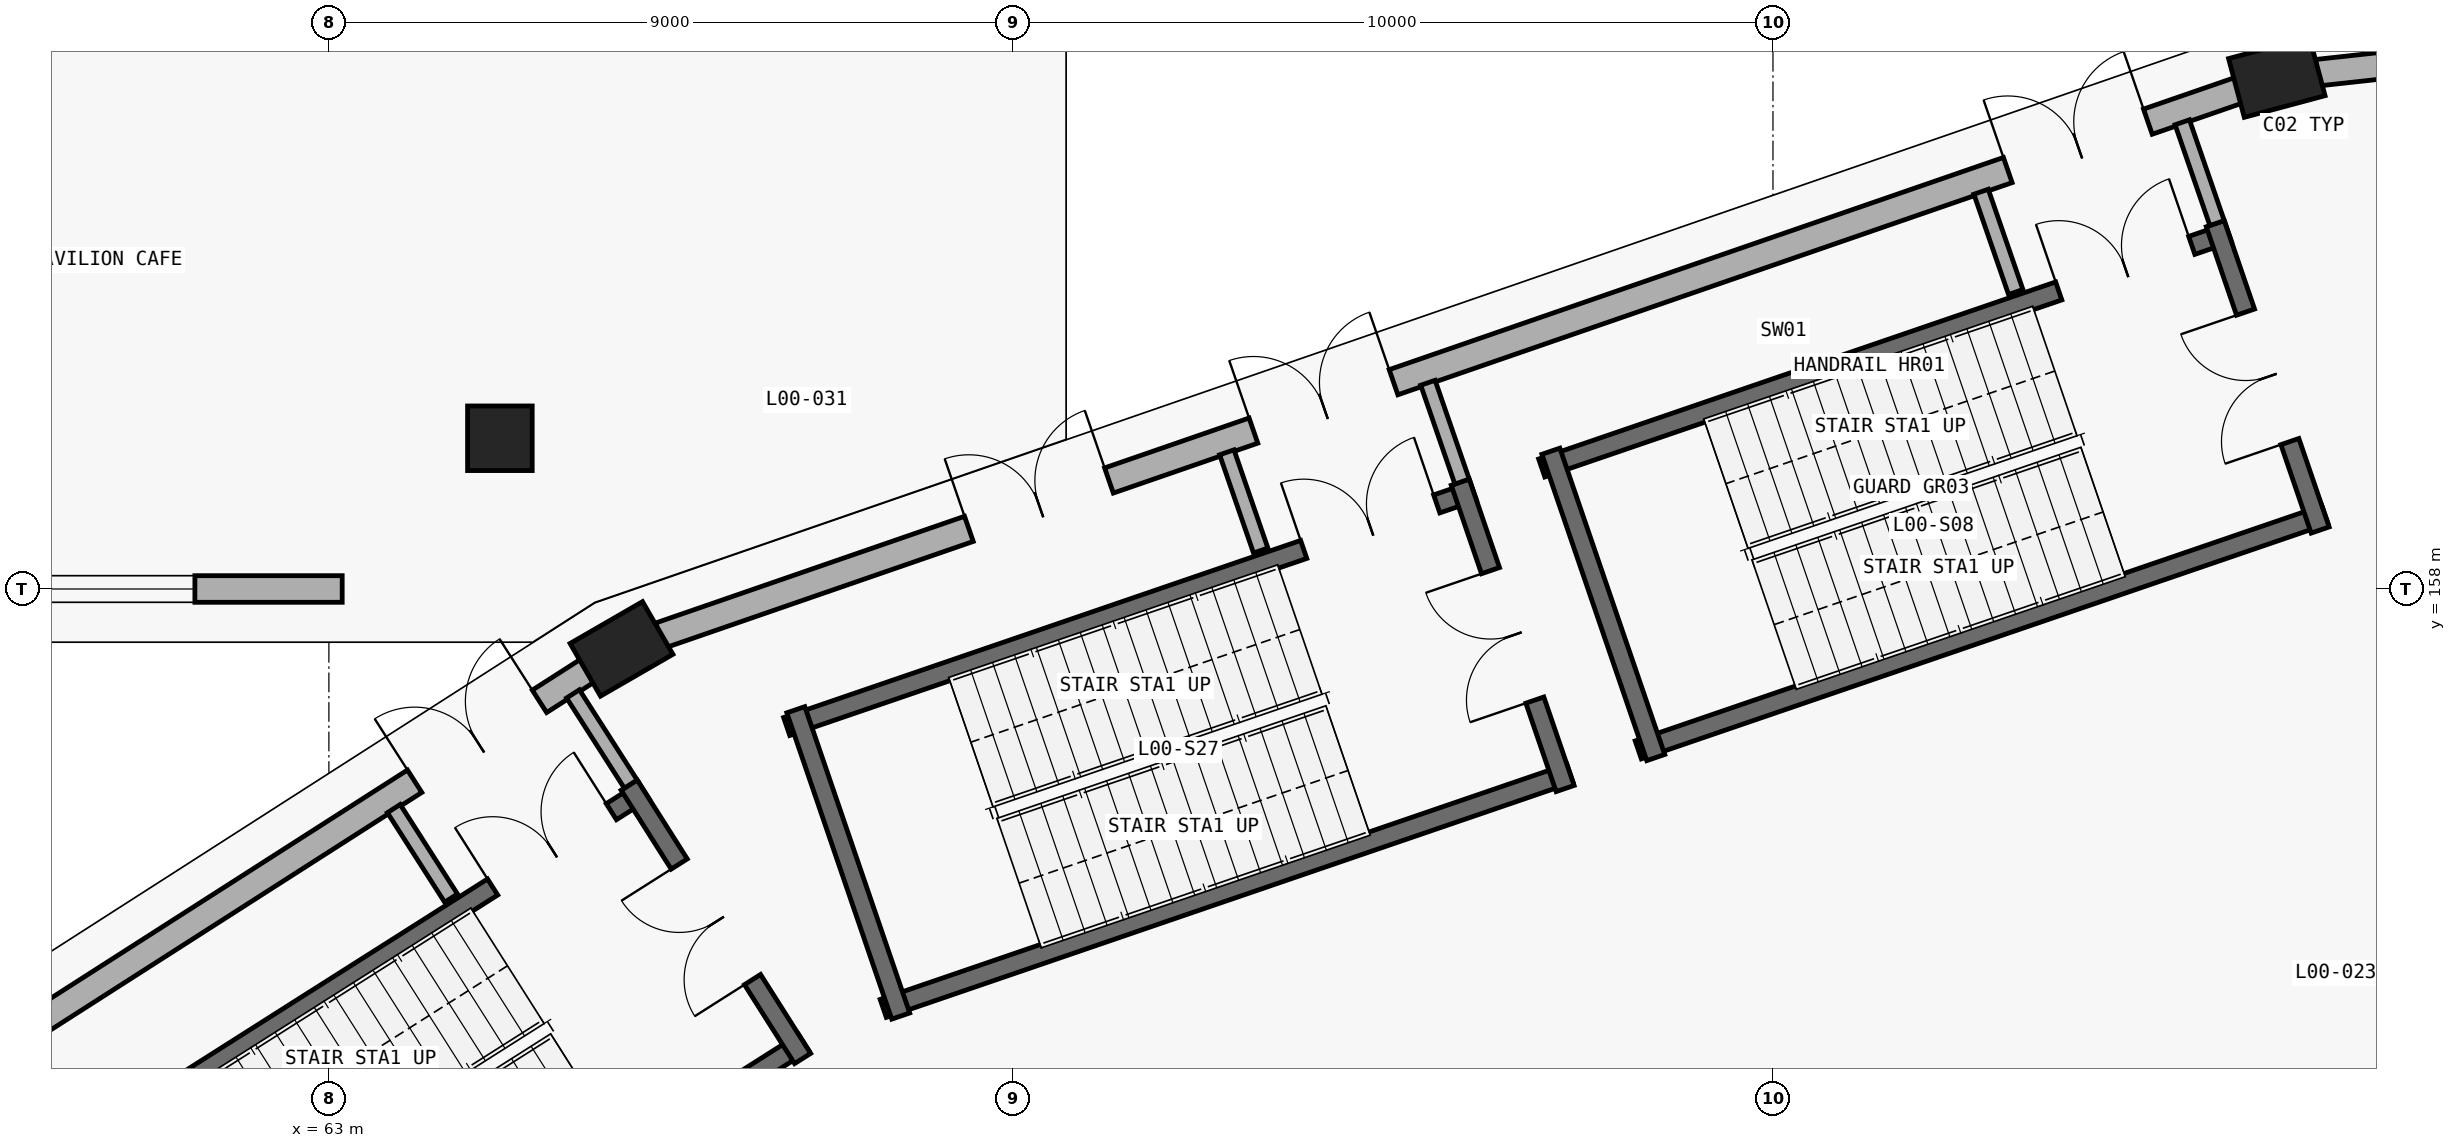
"""IFC4 building model, lengths in metres.
Left out: names, types, materials, properties, quantities, classifications, styles, units other than length and angle.
Written with IfcOpenShell. Run it as: python <this file> out.ifc"""

import sys

from ifc_helpers import new_model, si_unit, direction, frame, frame_2d, origin, origin_2d, place, context, subcontext, project, spatial, rectangle, circle, extrude, element, fill, save


model = new_model("IFC4")
c1 = context("Model", 3, precision=1e-05, world=origin(), true_north=direction((0.0, 1.0)))
c2 = subcontext(c1, "Body", "Model", "MODEL_VIEW")
j1 = project(units=[si_unit("LENGTHUNIT", "METRE"), si_unit("PLANEANGLEUNIT", "RADIAN")], contexts=[c1])
p1 = place(None, origin())
s1 = spatial("IfcSite", under=j1, at=p1, CompositionType="ELEMENT")
p2 = place(p1, origin())
s2 = spatial("IfcBuilding", under=s1, at=p2, CompositionType="ELEMENT")
p3 = place(p2, origin())
s3 = spatial("IfcBuildingStorey", under=s2, at=p3, CompositionType="ELEMENT", Elevation=0.0)
for number, where, z_axis, x_axis in (
    (1, (88.629, 164.734, 0.0), (0.0, 0.0, 1.0), (-0.259, 0.966, 0.0)),
    (2, (66.85, 157.212, 0.0), (0.0, 0.0, 1.0), (-0.5, 0.866, 0.0)),
):
    element("IfcColumn", number, at=place(p3, frame(where, z_axis=z_axis, x_axis=x_axis)), inside=s3, PredefinedType="COLUMN", context=c2, shape_type="SweptSolid", body=[
        extrude(rectangle(XDim=0.8, YDim=1.1, at=origin_2d()), origin(), (0.0, 0.0, 1.0), 5.4),
    ])
p4 = place(p3, frame((65.25, 159.983, 0.0), z_axis=(0.0, 0.0, 1.0), x_axis=(1.0, 0.0, 0.0)))
e3 = element("IfcColumn", 3, at=p4, inside=s3, PredefinedType="COLUMN", context=c2, shape_type="SweptSolid", body=[
    extrude(circle(Radius=0.425, at=origin_2d()), origin(), (0.0, 0.0, 1.0), 5.4),
])
p5 = place(p3, frame((89.157, 164.792, 0.0), z_axis=(0.0, 0.0, 1.0), x_axis=(0.994028735725, 0.10911861689, 0.0)))
e4 = element("IfcWall", 4, at=p5, inside=s3, PredefinedType="STANDARD", context=c2, shape_type="SweptSolid", body=[
    extrude(rectangle(XDim=22.452, YDim=0.35, at=frame_2d((11.226, 0.0))), origin(), (0.0, 0.0, 1.0), 4.165),
])
p6 = place(p5, frame((17.906, 0.0, 0.0)))
e5 = element("IfcOpeningElement", 5, at=p6, cuts=e4, PredefinedType="OPENING", context=c2, shape_type="SweptSolid", body=[
    extrude(rectangle(XDim=1.95, YDim=2.25, at=frame_2d((0.975, 1.125))), frame((0.0, 0.185, 0.0), z_axis=(0.0, -1.0, 0.0), x_axis=(1.0, 0.0, 0.0)), (0.0, 0.0, 1.0), 0.37),
])
p7 = place(p5, frame((3.838, 0.0, 0.0)))
e6 = element("IfcOpeningElement", 6, at=p7, cuts=e4, PredefinedType="OPENING", context=c2, shape_type="SweptSolid", body=[
    extrude(rectangle(XDim=3.1, YDim=2.58, at=frame_2d((1.55, 1.29))), frame((0.0, 0.185, 0.0), z_axis=(0.0, -1.0, 0.0), x_axis=(1.0, 0.0, 0.0)), (0.0, 0.0, 1.0), 0.37),
])
p8 = place(p3, frame((67.356, 157.387, 0.0), z_axis=(0.0, 0.0, 1.0), x_axis=(0.945215757663, 0.326446276538, 0.0)))
e7 = element("IfcWall", 7, at=p8, inside=s3, PredefinedType="STANDARD", context=c2, shape_type="SweptSolid", body=[
    extrude(rectangle(XDim=21.979, YDim=0.35, at=frame_2d((10.99, 0.0))), origin(), (0.0, 0.0, 1.0), 4.165),
])
p9 = place(p8, frame((18.761, 0.0, 0.0)))
e8 = element("IfcOpeningElement", 8, at=p9, cuts=e7, PredefinedType="OPENING", context=c2, shape_type="SweptSolid", body=[
    extrude(rectangle(XDim=1.95, YDim=2.25, at=frame_2d((0.975, 1.125))), frame((0.0, 0.185, 0.0), z_axis=(0.0, -1.0, 0.0), x_axis=(1.0, 0.0, 0.0)), (0.0, 0.0, 1.0), 0.37),
])
p10 = place(p8, frame((8.261, 0.0, 0.0)))
e9 = element("IfcOpeningElement", 9, at=p10, cuts=e7, PredefinedType="OPENING", context=c2, shape_type="SweptSolid", body=[
    extrude(rectangle(XDim=1.95, YDim=2.25, at=frame_2d((0.975, 1.125))), frame((0.0, 0.185, 0.0), z_axis=(0.0, -1.0, 0.0), x_axis=(1.0, 0.0, 0.0)), (0.0, 0.0, 1.0), 0.37),
])
p11 = place(p8, frame((4.3, 0.0, 0.0)))
e10 = element("IfcOpeningElement", 10, at=p11, cuts=e7, PredefinedType="OPENING", context=c2, shape_type="SweptSolid", body=[
    extrude(rectangle(XDim=1.95, YDim=2.25, at=frame_2d((0.975, 1.125))), frame((0.0, 0.185, 0.0), z_axis=(0.0, -1.0, 0.0), x_axis=(1.0, 0.0, 0.0)), (0.0, 0.0, 1.0), 0.37),
])
p12 = place(p3, frame((48.601, 145.535, 0.0), z_axis=(0.0, 0.0, 1.0), x_axis=(0.842308733224, 0.538995359845, 0.0)))
e11 = element("IfcWall", 11, at=p12, inside=s3, PredefinedType="STANDARD", context=c2, shape_type="SweptSolid", body=[
    extrude(rectangle(XDim=21.139, YDim=0.35, at=frame_2d((10.57, 0.0))), origin(), (0.0, 0.0, 1.0), 4.165),
])
p13 = place(p12, frame((18.434, 0.0, 0.0)))
e12 = element("IfcOpeningElement", 12, at=p13, cuts=e11, PredefinedType="OPENING", context=c2, shape_type="SweptSolid", body=[
    extrude(rectangle(XDim=1.95, YDim=2.25, at=frame_2d((0.975, 1.125))), frame((0.0, 0.185, 0.0), z_axis=(0.0, -1.0, 0.0), x_axis=(1.0, 0.0, 0.0)), (0.0, 0.0, 1.0), 0.37),
])
p14 = place(p12, frame((7.935, 0.0, 0.0)))
e13 = element("IfcOpeningElement", 13, at=p14, cuts=e11, PredefinedType="OPENING", context=c2, shape_type="SweptSolid", body=[
    extrude(rectangle(XDim=1.95, YDim=2.25, at=frame_2d((0.975, 1.125))), frame((0.0, 0.185, 0.0), z_axis=(0.0, -1.0, 0.0), x_axis=(1.0, 0.0, 0.0)), (0.0, 0.0, 1.0), 0.37),
])
p15 = place(p12, frame((4.098, 0.0, 0.0)))
e14 = element("IfcOpeningElement", 14, at=p15, cuts=e11, PredefinedType="OPENING", context=c2, shape_type="SweptSolid", body=[
    extrude(rectangle(XDim=1.95, YDim=2.25, at=frame_2d((0.975, 1.125))), frame((0.0, 0.185, 0.0), z_axis=(0.0, -1.0, 0.0), x_axis=(1.0, 0.0, 0.0)), (0.0, 0.0, 1.0), 0.37),
])
p16 = place(p3, frame((63.175, 158.0, 0.0), z_axis=(0.0, 0.0, 1.0), x_axis=(-1.0, 0.0, 0.0)))
e15 = element("IfcWall", 15, at=p16, inside=s3, PredefinedType="STANDARD", context=c2, shape_type="SweptSolid", body=[
    extrude(rectangle(XDim=8.75, YDim=0.35, at=frame_2d((4.375, 0.0))), origin(), (0.0, 0.0, 1.0), 4.384),
])
p17 = place(p16, frame((1.938, 0.0, 0.95)))
e16 = element("IfcOpeningElement", 16, at=p17, cuts=e15, PredefinedType="OPENING", context=c2, shape_type="SweptSolid", body=[
    extrude(rectangle(XDim=2.25, YDim=2.15, at=frame_2d((1.125, 1.075))), frame((0.0, 0.185, 0.0), z_axis=(0.0, -1.0, 0.0), x_axis=(1.0, 0.0, 0.0)), (0.0, 0.0, 1.0), 0.37),
])
p18 = place(p3, frame((78.958, 159.592, 0.0), z_axis=(0.0, 0.0, 1.0), x_axis=(0.946064424228, 0.323978556712, 0.0)))
e17 = element("IfcWall", 17, at=p18, inside=s3, PredefinedType="SHEAR", context=c2, shape_type="SweptSolid", body=[
    extrude(rectangle(XDim=9.55, YDim=0.25, at=frame_2d((4.775, 0.0))), origin(), (0.0, 0.0, 1.0), 5.1),
])
p19 = place(p18, frame((7.19, 0.0, 0.0)))
e18 = element("IfcOpeningElement", 18, at=p19, cuts=e17, PredefinedType="OPENING", context=c2, shape_type="SweptSolid", body=[
    extrude(rectangle(XDim=1.85, YDim=2.3, at=frame_2d((0.925, 1.15))), frame((0.0, 0.135, 0.0), z_axis=(0.0, -1.0, 0.0), x_axis=(1.0, 0.0, 0.0)), (0.0, 0.0, 1.0), 0.27),
])
p20 = place(p3, frame((80.228, 155.883, 0.0), z_axis=(0.0, 0.0, 1.0), x_axis=(0.946067107432, 0.323970721263, 0.0)))
e19 = element("IfcWall", 19, at=p20, inside=s3, PredefinedType="SHEAR", context=c2, shape_type="SweptSolid", body=[
    extrude(rectangle(XDim=9.55, YDim=0.25, at=frame_2d((4.775, 0.0))), origin(), (0.0, 0.0, 1.0), 5.1),
])
p21 = place(p3, frame((89.199, 158.776, 0.0), z_axis=(0.0, 0.0, 1.0), x_axis=(-0.323988758717, 0.946060930504, 0.0)))
e20 = element("IfcWall", 20, at=p21, inside=s3, PredefinedType="SHEAR", context=c2, shape_type="SweptSolid", body=[
    extrude(rectangle(XDim=4.26, YDim=0.25, at=frame_2d((2.13, 0.0))), origin(), (0.0, 0.0, 1.0), 5.1),
])
p22 = place(p21, frame((1.23, 0.0, 0.0)))
e21 = element("IfcOpeningElement", 21, at=p22, cuts=e20, PredefinedType="OPENING", context=c2, shape_type="SweptSolid", body=[
    extrude(rectangle(XDim=1.8, YDim=2.25, at=frame_2d((0.9, 1.125))), frame((0.0, 0.135, 0.0), z_axis=(0.0, -1.0, 0.0), x_axis=(1.0, 0.0, 0.0)), (0.0, 0.0, 1.0), 0.27),
])
p23 = place(p3, frame((79.078, 159.812, 0.0), z_axis=(0.0, 0.0, 1.0), x_axis=(0.323971192516, -0.946066946056, 0.0)))
e22 = element("IfcWall", 22, at=p23, inside=s3, PredefinedType="SHEAR", context=c2, shape_type="SweptSolid", body=[
    extrude(rectangle(XDim=4.26, YDim=0.25, at=frame_2d((2.13, 0.0))), origin(), (0.0, 0.0, 1.0), 5.1),
])
p24 = place(p3, frame((59.083, 150.227, 0.0), z_axis=(0.0, 0.0, 1.0), x_axis=(0.844391246241, 0.535727004427, 0.0)))
e23 = element("IfcWall", 23, at=p24, inside=s3, PredefinedType="SHEAR", context=c2, shape_type="SweptSolid", body=[
    extrude(rectangle(XDim=9.55, YDim=0.25, at=frame_2d((4.775, 0.0))), origin(), (0.0, 0.0, 1.0), 5.1),
])
p25 = place(p24, frame((7.19, 0.0, 0.0)))
e24 = element("IfcOpeningElement", 24, at=p25, cuts=e23, PredefinedType="OPENING", context=c2, shape_type="SweptSolid", body=[
    extrude(rectangle(XDim=1.85, YDim=2.3, at=frame_2d((0.925, 1.15))), frame((0.0, 0.135, 0.0), z_axis=(0.0, -1.0, 0.0), x_axis=(1.0, 0.0, 0.0)), (0.0, 0.0, 1.0), 0.27),
])
p26 = place(p3, frame((61.183, 146.917, 0.0), z_axis=(0.0, 0.0, 1.0), x_axis=(0.844391246241, 0.535727004427, 0.0)))
e25 = element("IfcWall", 25, at=p26, inside=s3, PredefinedType="SHEAR", context=c2, shape_type="SweptSolid", body=[
    extrude(rectangle(XDim=9.55, YDim=0.25, at=frame_2d((4.775, 0.0))), origin(), (0.0, 0.0, 1.0), 5.1),
])
p27 = place(p3, frame((69.233, 151.823, 0.0), z_axis=(0.0, 0.0, 1.0), x_axis=(-0.535684577572, 0.844418162613, 0.0)))
e26 = element("IfcWall", 26, at=p27, inside=s3, PredefinedType="SHEAR", context=c2, shape_type="SweptSolid", body=[
    extrude(rectangle(XDim=4.26, YDim=0.25, at=frame_2d((2.13, 0.0))), origin(), (0.0, 0.0, 1.0), 5.1),
])
p28 = place(p27, frame((1.23, 0.0, 0.0)))
e27 = element("IfcOpeningElement", 27, at=p28, cuts=e26, PredefinedType="OPENING", context=c2, shape_type="SweptSolid", body=[
    extrude(rectangle(XDim=1.8, YDim=2.25, at=frame_2d((0.9, 1.125))), frame((0.0, 0.135, 0.0), z_axis=(0.0, -1.0, 0.0), x_axis=(1.0, 0.0, 0.0)), (0.0, 0.0, 1.0), 0.27),
])
p29 = place(p3, frame((69.024, 156.191, 0.0), z_axis=(0.0, 0.0, 1.0), x_axis=(0.946064424228, 0.323978556712, 0.0)))
e28 = element("IfcWall", 28, at=p29, inside=s3, PredefinedType="SHEAR", context=c2, shape_type="SweptSolid", body=[
    extrude(rectangle(XDim=9.55, YDim=0.25, at=frame_2d((4.775, 0.0))), origin(), (0.0, 0.0, 1.0), 5.1),
])
p30 = place(p29, frame((7.19, 0.0, 0.0)))
e29 = element("IfcOpeningElement", 29, at=p30, cuts=e28, PredefinedType="OPENING", context=c2, shape_type="SweptSolid", body=[
    extrude(rectangle(XDim=1.85, YDim=2.3, at=frame_2d((0.925, 1.15))), frame((0.0, 0.135, 0.0), z_axis=(0.0, -1.0, 0.0), x_axis=(1.0, 0.0, 0.0)), (0.0, 0.0, 1.0), 0.27),
])
p31 = place(p3, frame((70.294, 152.482, 0.0), z_axis=(0.0, 0.0, 1.0), x_axis=(0.946064424228, 0.323978556712, 0.0)))
e30 = element("IfcWall", 30, at=p31, inside=s3, PredefinedType="SHEAR", context=c2, shape_type="SweptSolid", body=[
    extrude(rectangle(XDim=9.55, YDim=0.25, at=frame_2d((4.775, 0.0))), origin(), (0.0, 0.0, 1.0), 5.1),
])
p32 = place(p3, frame((79.265, 155.375, 0.0), z_axis=(0.0, 0.0, 1.0), x_axis=(-0.323971192516, 0.946066946056, 0.0)))
e31 = element("IfcWall", 31, at=p32, inside=s3, PredefinedType="SHEAR", context=c2, shape_type="SweptSolid", body=[
    extrude(rectangle(XDim=4.26, YDim=0.25, at=frame_2d((2.13, 0.0))), origin(), (0.0, 0.0, 1.0), 5.1),
])
p33 = place(p32, frame((1.23, 0.0, 0.0)))
e32 = element("IfcOpeningElement", 32, at=p33, cuts=e31, PredefinedType="OPENING", context=c2, shape_type="SweptSolid", body=[
    extrude(rectangle(XDim=1.8, YDim=2.25, at=frame_2d((0.9, 1.125))), frame((0.0, 0.135, 0.0), z_axis=(0.0, -1.0, 0.0), x_axis=(1.0, 0.0, 0.0)), (0.0, 0.0, 1.0), 0.27),
])
p34 = place(p3, frame((69.144, 156.411, 0.0), z_axis=(0.0, 0.0, 1.0), x_axis=(0.323988758717, -0.946060930504, 0.0)))
e33 = element("IfcWall", 33, at=p34, inside=s3, PredefinedType="SHEAR", context=c2, shape_type="SweptSolid", body=[
    extrude(rectangle(XDim=4.26, YDim=0.25, at=frame_2d((2.13, 0.0))), origin(), (0.0, 0.0, 1.0), 5.1),
])
p35 = place(p3, frame((87.843, 162.814, 0.0), z_axis=(0.0, 0.0, 1.0), x_axis=(-0.326548526872, 0.945180437587, 0.0)))
e34 = element("IfcWall", 34, at=p35, inside=s3, PredefinedType="PARTITIONING", context=c2, shape_type="SweptSolid", body=[
    extrude(rectangle(XDim=1.403, YDim=0.2, at=frame_2d((0.701, 0.0))), origin(), (0.0, 0.0, 1.0), 4.165),
])
p36 = place(p3, frame((85.194, 161.907, 0.0), z_axis=(0.0, 0.0, 1.0), x_axis=(-0.326599813584, 0.945162717085, 0.0)))
e35 = element("IfcWall", 35, at=p36, inside=s3, PredefinedType="PARTITIONING", context=c2, shape_type="SweptSolid", body=[
    extrude(rectangle(XDim=1.396, YDim=0.2, at=frame_2d((0.698, 0.0))), origin(), (0.0, 0.0, 1.0), 4.165),
])
p37 = place(p3, frame((66.972, 155.433, 0.0), z_axis=(0.0, 0.0, 1.0), x_axis=(-0.539171685924, 0.842195875731, 0.0)))
e36 = element("IfcWall", 36, at=p37, inside=s3, PredefinedType="PARTITIONING", context=c2, shape_type="SweptSolid", body=[
    extrude(rectangle(XDim=1.409, YDim=0.2, at=frame_2d((0.705, 0.0))), origin(), (0.0, 0.0, 1.0), 4.165),
])
p38 = place(p3, frame((64.607, 153.933, 0.0), z_axis=(0.0, 0.0, 1.0), x_axis=(-0.538885207577, 0.842379209771, 0.0)))
e37 = element("IfcWall", 37, at=p38, inside=s3, PredefinedType="PARTITIONING", context=c2, shape_type="SweptSolid", body=[
    extrude(rectangle(XDim=1.398, YDim=0.2, at=frame_2d((0.699, 0.0))), origin(), (0.0, 0.0, 1.0), 4.165),
])
p39 = place(p3, frame((77.909, 159.413, 0.0), z_axis=(0.0, 0.0, 1.0), x_axis=(-0.326488531048, 0.945201163295, 0.0)))
e38 = element("IfcWall", 38, at=p39, inside=s3, PredefinedType="PARTITIONING", context=c2, shape_type="SweptSolid", body=[
    extrude(rectangle(XDim=1.375, YDim=0.2, at=frame_2d((0.688, 0.0))), origin(), (0.0, 0.0, 1.0), 4.165),
])
p40 = place(p3, frame((75.26, 158.506, 0.0), z_axis=(0.0, 0.0, 1.0), x_axis=(-0.326337459961, 0.945253332301, 0.0)))
e39 = element("IfcWall", 39, at=p40, inside=s3, PredefinedType="PARTITIONING", context=c2, shape_type="SweptSolid", body=[
    extrude(rectangle(XDim=1.367, YDim=0.2, at=frame_2d((0.683, 0.0))), origin(), (0.0, 0.0, 1.0), 4.165),
])
p41 = place(p9, origin())
e40 = element("IfcDoor", 40, at=p41, inside=s3, OperationType="DOUBLE_DOOR_SINGLE_SWING", PredefinedType="DOOR", context=c2, shape_type="SweptSolid", body=[
    extrude(rectangle(XDim=1.95, YDim=2.25, at=frame_2d((0.975, 1.125))), frame((0.0, 0.025, 0.0), z_axis=(0.0, -1.0, 0.0), x_axis=(1.0, 0.0, 0.0)), (0.0, 0.0, 1.0), 0.05),
])
fill(e8, e40)
p42 = place(p10, origin())
e41 = element("IfcDoor", 41, at=p42, inside=s3, OperationType="DOUBLE_DOOR_SINGLE_SWING", PredefinedType="DOOR", context=c2, shape_type="SweptSolid", body=[
    extrude(rectangle(XDim=1.95, YDim=2.25, at=frame_2d((0.975, 1.125))), frame((0.0, 0.025, 0.0), z_axis=(0.0, -1.0, 0.0), x_axis=(1.0, 0.0, 0.0)), (0.0, 0.0, 1.0), 0.05),
])
fill(e9, e41)
p43 = place(p11, origin())
e42 = element("IfcDoor", 42, at=p43, inside=s3, OperationType="DOUBLE_DOOR_SINGLE_SWING", PredefinedType="DOOR", context=c2, shape_type="SweptSolid", body=[
    extrude(rectangle(XDim=1.95, YDim=2.25, at=frame_2d((0.975, 1.125))), frame((0.0, 0.025, 0.0), z_axis=(0.0, -1.0, 0.0), x_axis=(1.0, 0.0, 0.0)), (0.0, 0.0, 1.0), 0.05),
])
fill(e10, e42)
p44 = place(p13, origin())
e43 = element("IfcDoor", 43, at=p44, inside=s3, OperationType="DOUBLE_DOOR_SINGLE_SWING", PredefinedType="DOOR", context=c2, shape_type="SweptSolid", body=[
    extrude(rectangle(XDim=1.95, YDim=2.25, at=frame_2d((0.975, 1.125))), frame((0.0, 0.025, 0.0), z_axis=(0.0, -1.0, 0.0), x_axis=(1.0, 0.0, 0.0)), (0.0, 0.0, 1.0), 0.05),
])
fill(e12, e43)
p45 = place(p17, origin())
e44 = element("IfcWindow", 44, at=p45, inside=s3, PartitioningType="SINGLE_PANEL", PredefinedType="WINDOW", context=c2, shape_type="SweptSolid", body=[
    extrude(rectangle(XDim=2.25, YDim=2.15, at=frame_2d((1.125, 1.075))), frame((0.0, 0.03, 0.0), z_axis=(0.0, -1.0, 0.0), x_axis=(1.0, 0.0, 0.0)), (0.0, 0.0, 1.0), 0.06),
])
fill(e16, e44)
p46 = place(p22, origin())
e45 = element("IfcDoor", 45, at=p46, inside=s3, OperationType="DOUBLE_DOOR_SINGLE_SWING", PredefinedType="DOOR", context=c2, shape_type="SweptSolid", body=[
    extrude(rectangle(XDim=1.8, YDim=2.25, at=frame_2d((0.9, 1.125))), frame((0.0, 0.025, 0.0), z_axis=(0.0, -1.0, 0.0), x_axis=(1.0, 0.0, 0.0)), (0.0, 0.0, 1.0), 0.05),
])
fill(e21, e45)
p47 = place(p19, origin())
e46 = element("IfcDoor", 46, at=p47, inside=s3, OperationType="DOUBLE_DOOR_SINGLE_SWING", PredefinedType="DOOR", context=c2, shape_type="SweptSolid", body=[
    extrude(rectangle(XDim=1.85, YDim=2.3, at=frame_2d((0.925, 1.15))), frame((0.0, 0.025, 0.0), z_axis=(0.0, -1.0, 0.0), x_axis=(1.0, 0.0, 0.0)), (0.0, 0.0, 1.0), 0.05),
])
fill(e18, e46)
p48 = place(p28, origin())
e47 = element("IfcDoor", 47, at=p48, inside=s3, OperationType="DOUBLE_DOOR_SINGLE_SWING", PredefinedType="DOOR", context=c2, shape_type="SweptSolid", body=[
    extrude(rectangle(XDim=1.8, YDim=2.25, at=frame_2d((0.9, 1.125))), frame((0.0, 0.025, 0.0), z_axis=(0.0, -1.0, 0.0), x_axis=(1.0, 0.0, 0.0)), (0.0, 0.0, 1.0), 0.05),
])
fill(e27, e47)
p49 = place(p25, origin())
e48 = element("IfcDoor", 48, at=p49, inside=s3, OperationType="DOUBLE_DOOR_SINGLE_SWING", PredefinedType="DOOR", context=c2, shape_type="SweptSolid", body=[
    extrude(rectangle(XDim=1.85, YDim=2.3, at=frame_2d((0.925, 1.15))), frame((0.0, 0.025, 0.0), z_axis=(0.0, -1.0, 0.0), x_axis=(1.0, 0.0, 0.0)), (0.0, 0.0, 1.0), 0.05),
])
fill(e24, e48)
p50 = place(p33, origin())
e49 = element("IfcDoor", 49, at=p50, inside=s3, OperationType="DOUBLE_DOOR_SINGLE_SWING", PredefinedType="DOOR", context=c2, shape_type="SweptSolid", body=[
    extrude(rectangle(XDim=1.8, YDim=2.25, at=frame_2d((0.9, 1.125))), frame((0.0, 0.025, 0.0), z_axis=(0.0, -1.0, 0.0), x_axis=(1.0, 0.0, 0.0)), (0.0, 0.0, 1.0), 0.05),
])
fill(e32, e49)
p51 = place(p30, origin())
e50 = element("IfcDoor", 50, at=p51, inside=s3, OperationType="DOUBLE_DOOR_SINGLE_SWING", PredefinedType="DOOR", context=c2, shape_type="SweptSolid", body=[
    extrude(rectangle(XDim=1.85, YDim=2.3, at=frame_2d((0.925, 1.15))), frame((0.0, 0.025, 0.0), z_axis=(0.0, -1.0, 0.0), x_axis=(1.0, 0.0, 0.0)), (0.0, 0.0, 1.0), 0.05),
])
fill(e29, e50)
save(model, sys.argv[1])
